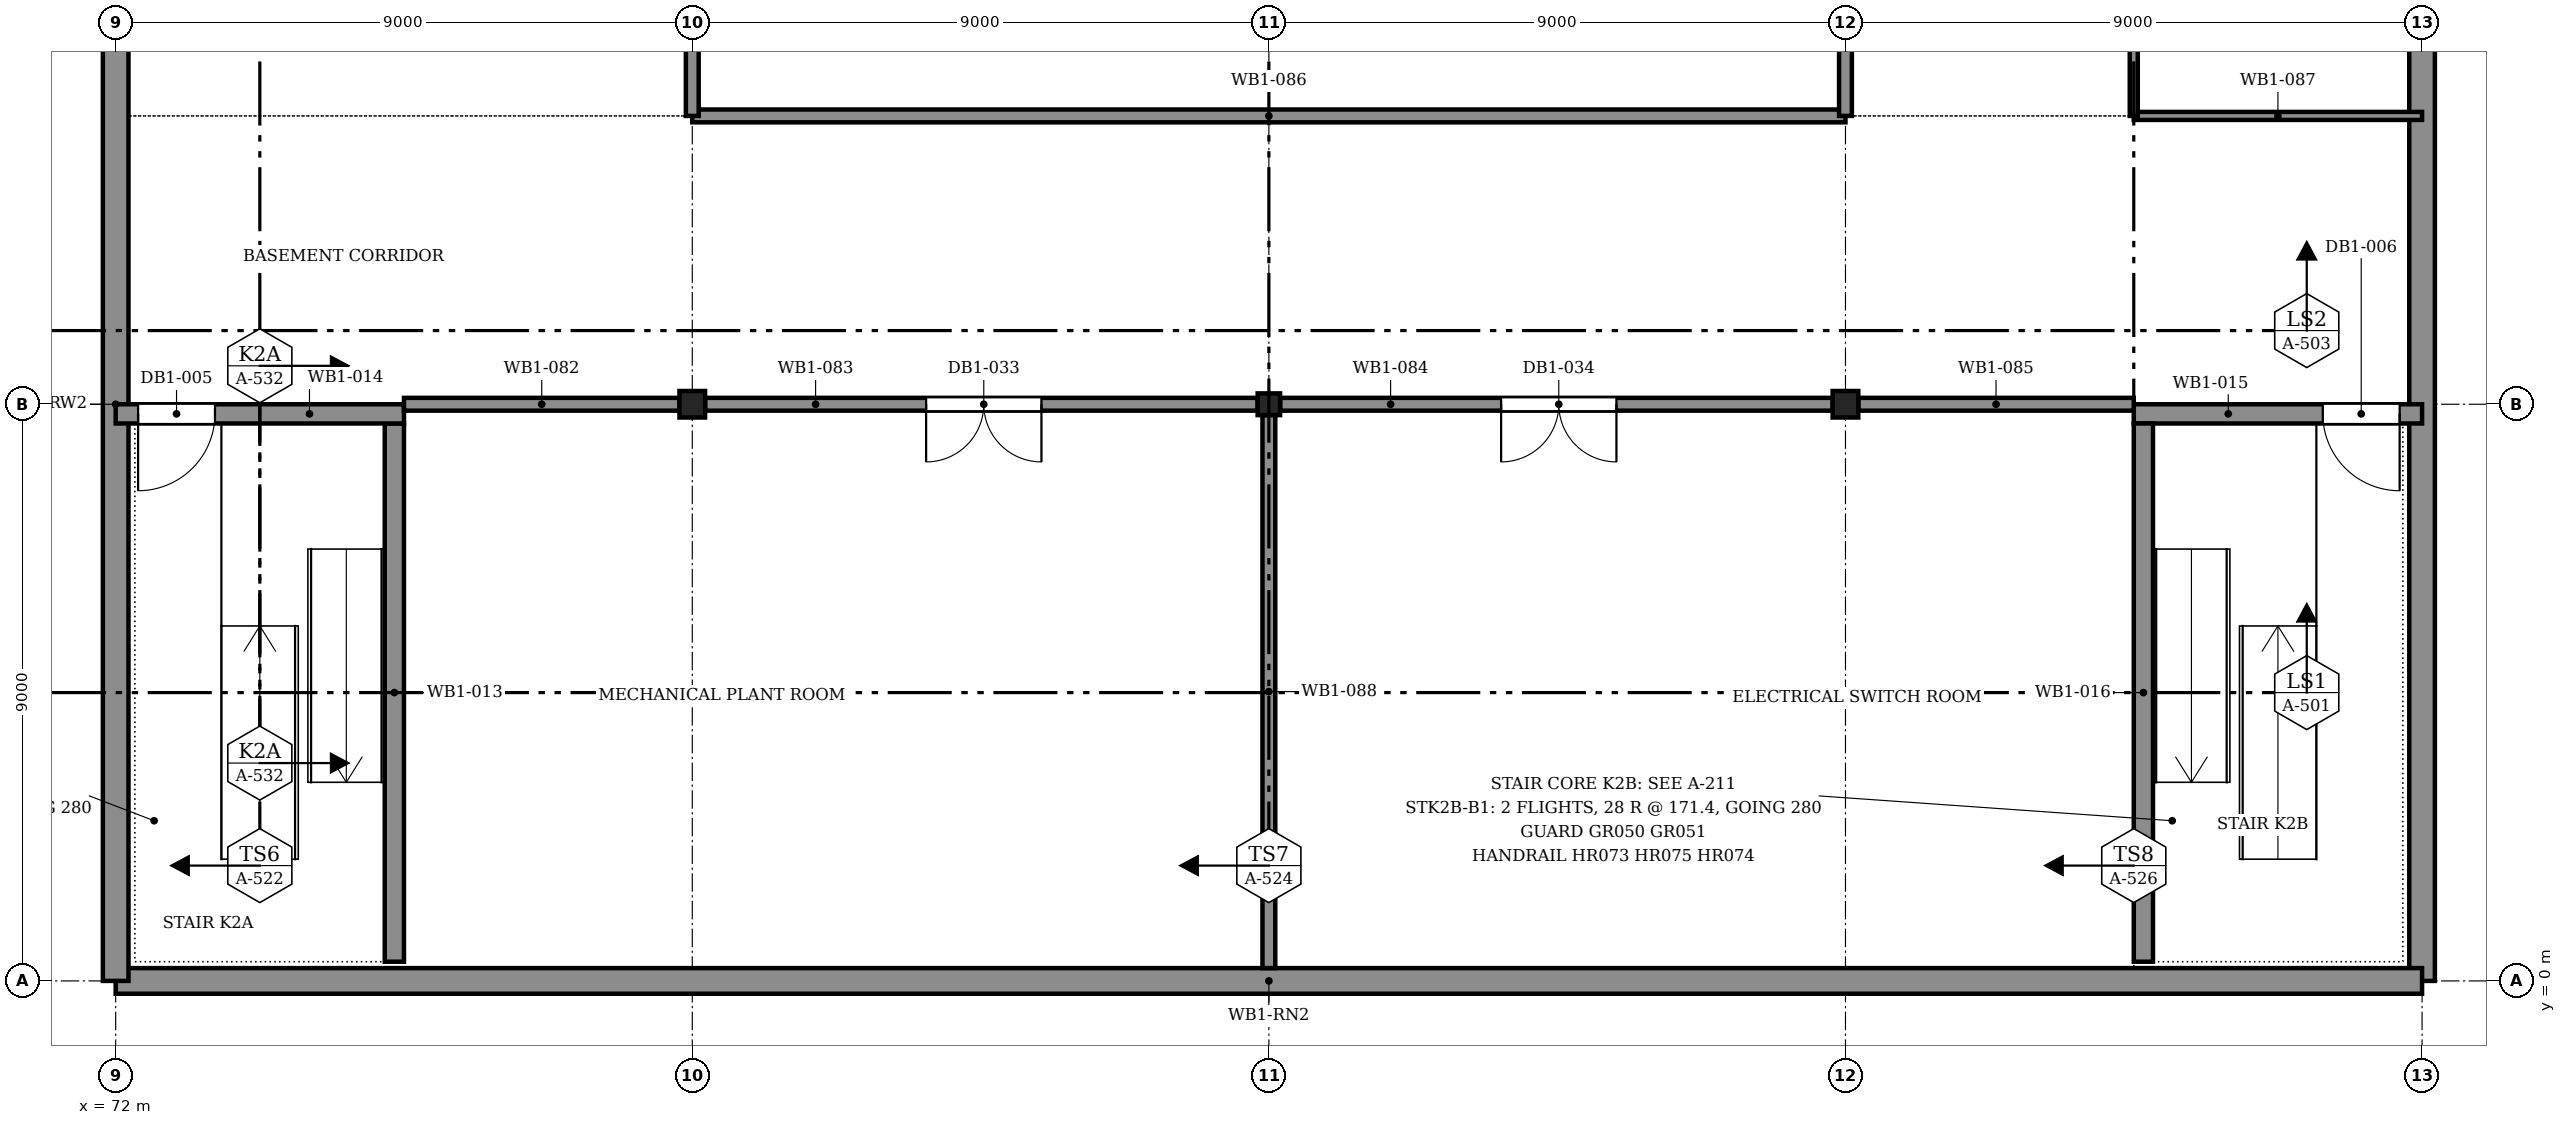
"""IFC4 building model, lengths in metres.
Left out: names, types, materials, properties, quantities, classifications, styles, units other than length and angle.
Written with IfcOpenShell. Run it as: python <this file> out.ifc"""

import sys

from ifc_helpers import new_model, si_unit, direction, frame, frame_2d, origin, origin_2d, place, context, subcontext, project, spatial, rectangle, i_section, extrude, element, fill, save


model = new_model("IFC4")
c1 = context("Model", 3, precision=1e-05, world=origin(), true_north=direction((0.0, 1.0)))
c2 = subcontext(c1, "Body", "Model", "MODEL_VIEW")
j1 = project(units=[si_unit("LENGTHUNIT", "METRE"), si_unit("PLANEANGLEUNIT", "RADIAN")], contexts=[c1])
p1 = place(None, origin())
s1 = spatial("IfcSite", under=j1, at=p1, CompositionType="ELEMENT")
p2 = place(p1, origin())
s2 = spatial("IfcBuilding", under=s1, at=p2, CompositionType="ELEMENT")
p3 = place(p2, frame((0.0, 0.0, -4.8)))
s3 = spatial("IfcBuildingStorey", under=s2, at=p3, CompositionType="ELEMENT", Elevation=-4.8)
p4 = place(p3, frame((108.0, 0.0, 0.0), z_axis=(0.0, 0.0, 1.0), x_axis=(0.0, 1.0, 0.0)))
e1 = element("IfcWall", 1, at=p4, inside=s3, PredefinedType="SOLIDWALL", context=c2, shape_type="SweptSolid", body=[
    extrude(rectangle(XDim=63.0, YDim=0.4, at=frame_2d((31.5, 0.0))), origin(), (0.0, 0.0, 1.0), 4.8),
])
p5 = place(p3, frame((72.0, 0.0, 0.0), z_axis=(0.0, 0.0, 1.0), x_axis=(1.0, 0.0, 0.0)))
e2 = element("IfcWall", 2, at=p5, inside=s3, PredefinedType="SOLIDWALL", context=c2, shape_type="SweptSolid", body=[
    extrude(rectangle(XDim=36.0, YDim=0.4, at=frame_2d((18.0, 0.0))), origin(), (0.0, 0.0, 1.0), 4.8),
])
p6 = place(p3, frame((72.0, 0.0, 0.0), z_axis=(0.0, 0.0, 1.0), x_axis=(0.0, 1.0, 0.0)))
e3 = element("IfcWall", 3, at=p6, inside=s3, PredefinedType="SOLIDWALL", context=c2, shape_type="SweptSolid", body=[
    extrude(rectangle(XDim=18.0, YDim=0.4, at=frame_2d((9.0, 0.0))), origin(), (0.0, 0.0, 1.0), 4.8),
])
p7 = place(p3, frame((81.0, 9.0, -0.6), z_axis=(0.0, 0.0, 1.0), x_axis=(1.0, 0.0, 0.0)))
e4 = element("IfcColumn", 4, at=p7, inside=s3, PredefinedType="COLUMN", context=c2, shape_type="SweptSolid", body=[
    extrude(i_section(OverallWidth=0.4, OverallDepth=0.414, WebThickness=0.025, FlangeThickness=0.032, at=origin_2d()), origin(), (0.0, 0.0, 1.0), 5.4),
])
p8 = place(p3, frame((90.0, 9.0, -0.6), z_axis=(0.0, 0.0, 1.0), x_axis=(1.0, 0.0, 0.0)))
e5 = element("IfcColumn", 5, at=p8, inside=s3, PredefinedType="COLUMN", context=c2, shape_type="SweptSolid", body=[
    extrude(i_section(OverallWidth=0.35, OverallDepth=0.339, WebThickness=0.025, FlangeThickness=0.032, at=origin_2d()), origin(), (0.0, 0.0, 1.0), 5.4),
])
p9 = place(p3, frame((99.0, 9.0, -0.6), z_axis=(0.0, 0.0, 1.0), x_axis=(1.0, 0.0, 0.0)))
e6 = element("IfcColumn", 6, at=p9, inside=s3, PredefinedType="COLUMN", context=c2, shape_type="SweptSolid", body=[
    extrude(i_section(OverallWidth=0.4, OverallDepth=0.414, WebThickness=0.025, FlangeThickness=0.032, at=origin_2d()), origin(), (0.0, 0.0, 1.0), 5.4),
])
p10 = place(p3, frame((76.35, 0.3, 0.0), z_axis=(0.0, 0.0, 1.0), x_axis=(0.0, 1.0, 0.0)))
e7 = element("IfcWall", 7, at=p10, inside=s3, PredefinedType="SOLIDWALL", context=c2, shape_type="SweptSolid", body=[
    extrude(rectangle(XDim=8.4, YDim=0.3, at=frame_2d((4.2, 0.0))), origin(), (0.0, 0.0, 1.0), 4.8),
])
p11 = place(p3, frame((72.0, 8.85, 0.0), z_axis=(0.0, 0.0, 1.0), x_axis=(1.0, 0.0, 0.0)))
e8 = element("IfcWall", 8, at=p11, inside=s3, PredefinedType="SOLIDWALL", context=c2, shape_type="SweptSolid", body=[
    extrude(rectangle(XDim=4.5, YDim=0.3, at=frame_2d((2.25, 0.0))), origin(), (0.0, 0.0, 1.0), 4.8),
])
p12 = place(p11, frame((0.35, 0.0, 0.0)))
e9 = element("IfcOpeningElement", 9, at=p12, cuts=e8, PredefinedType="OPENING", context=c2, shape_type="SweptSolid", body=[
    extrude(rectangle(XDim=1.2, YDim=2.1, at=frame_2d((0.6, 1.05))), frame((0.0, 0.16, 0.0), z_axis=(0.0, -1.0, 0.0), x_axis=(1.0, 0.0, 0.0)), (0.0, 0.0, 1.0), 0.32),
])
p13 = place(p3, frame((103.5, 8.85, 0.0), z_axis=(0.0, 0.0, 1.0), x_axis=(1.0, 0.0, 0.0)))
e10 = element("IfcWall", 10, at=p13, inside=s3, PredefinedType="SOLIDWALL", context=c2, shape_type="SweptSolid", body=[
    extrude(rectangle(XDim=4.5, YDim=0.3, at=frame_2d((2.25, 0.0))), origin(), (0.0, 0.0, 1.0), 4.8),
])
p14 = place(p13, frame((2.95, 0.0, 0.0)))
e11 = element("IfcOpeningElement", 11, at=p14, cuts=e10, PredefinedType="OPENING", context=c2, shape_type="SweptSolid", body=[
    extrude(rectangle(XDim=1.2, YDim=2.1, at=frame_2d((0.6, 1.05))), frame((0.0, 0.16, 0.0), z_axis=(0.0, -1.0, 0.0), x_axis=(1.0, 0.0, 0.0)), (0.0, 0.0, 1.0), 0.32),
])
p15 = place(p3, frame((103.65, 0.3, 0.0), z_axis=(0.0, 0.0, 1.0), x_axis=(0.0, 1.0, 0.0)))
e12 = element("IfcWall", 12, at=p15, inside=s3, PredefinedType="SOLIDWALL", context=c2, shape_type="SweptSolid", body=[
    extrude(rectangle(XDim=8.4, YDim=0.3, at=frame_2d((4.2, 0.0))), origin(), (0.0, 0.0, 1.0), 4.8),
])
p16 = place(p3, frame((76.5, 9.0, 0.0), z_axis=(0.0, 0.0, 1.0), x_axis=(1.0, 0.0, 0.0)))
e13 = element("IfcWall", 13, at=p16, inside=s3, PredefinedType="PARTITIONING", context=c2, shape_type="SweptSolid", body=[
    extrude(rectangle(XDim=4.3, YDim=0.2, at=frame_2d((2.15, 0.0))), origin(), (0.0, 0.0, 1.0), 4.023),
])
p17 = place(p3, frame((81.2, 9.0, 0.0), z_axis=(0.0, 0.0, 1.0), x_axis=(1.0, 0.0, 0.0)))
e14 = element("IfcWall", 14, at=p17, inside=s3, PredefinedType="PARTITIONING", context=c2, shape_type="SweptSolid", body=[
    extrude(rectangle(XDim=8.625, YDim=0.2, at=frame_2d((4.312, 0.0))), origin(), (0.0, 0.0, 1.0), 4.023),
])
p18 = place(p17, frame((3.45, 0.0, 0.0)))
e15 = element("IfcOpeningElement", 15, at=p18, cuts=e14, PredefinedType="OPENING", context=c2, shape_type="SweptSolid", body=[
    extrude(rectangle(XDim=1.8, YDim=2.1, at=frame_2d((0.9, 1.05))), frame((0.0, 0.11, 0.0), z_axis=(0.0, -1.0, 0.0), x_axis=(1.0, 0.0, 0.0)), (0.0, 0.0, 1.0), 0.22),
])
p19 = place(p3, frame((90.175, 9.0, 0.0), z_axis=(0.0, 0.0, 1.0), x_axis=(1.0, 0.0, 0.0)))
e16 = element("IfcWall", 16, at=p19, inside=s3, PredefinedType="PARTITIONING", context=c2, shape_type="SweptSolid", body=[
    extrude(rectangle(XDim=8.625, YDim=0.2, at=frame_2d((4.312, 0.0))), origin(), (0.0, 0.0, 1.0), 4.023),
])
p20 = place(p19, frame((3.45, 0.0, 0.0)))
e17 = element("IfcOpeningElement", 17, at=p20, cuts=e16, PredefinedType="OPENING", context=c2, shape_type="SweptSolid", body=[
    extrude(rectangle(XDim=1.8, YDim=2.1, at=frame_2d((0.9, 1.05))), frame((0.0, 0.11, 0.0), z_axis=(0.0, -1.0, 0.0), x_axis=(1.0, 0.0, 0.0)), (0.0, 0.0, 1.0), 0.22),
])
p21 = place(p3, frame((99.2, 9.0, 0.0), z_axis=(0.0, 0.0, 1.0), x_axis=(1.0, 0.0, 0.0)))
e18 = element("IfcWall", 18, at=p21, inside=s3, PredefinedType="PARTITIONING", context=c2, shape_type="SweptSolid", body=[
    extrude(rectangle(XDim=4.3, YDim=0.2, at=frame_2d((2.15, 0.0))), origin(), (0.0, 0.0, 1.0), 4.023),
])
p22 = place(p3, frame((81.0, 13.5, 0.0), z_axis=(0.0, 0.0, 1.0), x_axis=(1.0, 0.0, 0.0)))
e19 = element("IfcWall", 19, at=p22, inside=s3, PredefinedType="PARTITIONING", context=c2, shape_type="SweptSolid", body=[
    extrude(rectangle(XDim=18.0, YDim=0.2, at=frame_2d((9.0, 0.0))), origin(), (0.0, 0.0, 1.0), 4.023),
])
p23 = place(p3, frame((103.5, 13.5, 0.0), z_axis=(0.0, 0.0, 1.0), x_axis=(1.0, 0.0, 0.0)))
e20 = element("IfcWall", 20, at=p23, inside=s3, PredefinedType="PARTITIONING", context=c2, shape_type="SweptSolid", body=[
    extrude(rectangle(XDim=4.5, YDim=0.125, at=frame_2d((2.25, 0.0))), origin(), (0.0, 0.0, 1.0), 4.181),
])
p24 = place(p3, frame((90.0, 0.2, 0.0), z_axis=(0.0, 0.0, 1.0), x_axis=(0.0, 1.0, 0.0)))
e21 = element("IfcWall", 21, at=p24, inside=s3, PredefinedType="PARTITIONING", context=c2, shape_type="SweptSolid", body=[
    extrude(rectangle(XDim=8.631, YDim=0.2, at=frame_2d((4.315, 0.0))), origin(), (0.0, 0.0, 1.0), 4.023),
])
p25 = place(p3, frame((81.0, 13.5, 0.0), z_axis=(0.0, 0.0, 1.0), x_axis=(0.0, 1.0, 0.0)))
e22 = element("IfcWall", 22, at=p25, inside=s3, PredefinedType="PARTITIONING", context=c2, shape_type="SweptSolid", body=[
    extrude(rectangle(XDim=4.293, YDim=0.2, at=frame_2d((2.146, 0.0))), origin(), (0.0, 0.0, 1.0), 4.023),
])
p26 = place(p25, frame((1.21, 0.0, 0.0)))
e23 = element("IfcOpeningElement", 23, at=p26, cuts=e22, PredefinedType="OPENING", context=c2, shape_type="SweptSolid", body=[
    extrude(rectangle(XDim=1.8, YDim=2.1, at=frame_2d((0.9, 1.05))), frame((0.0, 0.11, 0.0), z_axis=(0.0, -1.0, 0.0), x_axis=(1.0, 0.0, 0.0)), (0.0, 0.0, 1.0), 0.22),
])
p27 = place(p3, frame((99.0, 13.5, 0.0), z_axis=(0.0, 0.0, 1.0), x_axis=(0.0, 1.0, 0.0)))
e24 = element("IfcWall", 24, at=p27, inside=s3, PredefinedType="PARTITIONING", context=c2, shape_type="SweptSolid", body=[
    extrude(rectangle(XDim=4.331, YDim=0.2, at=frame_2d((2.165, 0.0))), origin(), (0.0, 0.0, 1.0), 4.023),
])
p28 = place(p3, frame((103.5, 13.5, 0.0), z_axis=(0.0, 0.0, 1.0), x_axis=(0.0, 1.0, 0.0)))
e25 = element("IfcWall", 25, at=p28, inside=s3, PredefinedType="PARTITIONING", context=c2, shape_type="SweptSolid", body=[
    extrude(rectangle(XDim=13.5, YDim=0.125, at=frame_2d((6.75, 0.0))), origin(), (0.0, 0.0, 1.0), 4.023),
])
p29 = place(p28, frame((6.272, 0.0, 0.0)))
e26 = element("IfcOpeningElement", 26, at=p29, cuts=e25, PredefinedType="OPENING", context=c2, shape_type="SweptSolid", body=[
    extrude(rectangle(XDim=1.0, YDim=2.1, at=frame_2d((0.5, 1.05))), frame((0.0, 0.073, 0.0), z_axis=(0.0, -1.0, 0.0), x_axis=(1.0, 0.0, 0.0)), (0.0, 0.0, 1.0), 0.145),
])
p30 = place(p12, frame((1.2, 0.0, 0.0), z_axis=(0.0, 0.0, 1.0), x_axis=(-1.0, 0.0, 0.0)))
e27 = element("IfcDoor", 27, at=p30, inside=s3, OperationType="SINGLE_SWING_LEFT", PredefinedType="DOOR", context=c2, shape_type="SweptSolid", body=[
    extrude(rectangle(XDim=1.2, YDim=2.1, at=frame_2d((0.6, 1.05))), frame((0.0, 0.025, 0.0), z_axis=(0.0, -1.0, 0.0), x_axis=(1.0, 0.0, 0.0)), (0.0, 0.0, 1.0), 0.05),
])
fill(e9, e27)
p31 = place(p14, frame((1.2, 0.0, 0.0), z_axis=(0.0, 0.0, 1.0), x_axis=(-1.0, 0.0, 0.0)))
e28 = element("IfcDoor", 28, at=p31, inside=s3, OperationType="SINGLE_SWING_RIGHT", PredefinedType="DOOR", context=c2, shape_type="SweptSolid", body=[
    extrude(rectangle(XDim=1.2, YDim=2.1, at=frame_2d((0.6, 1.05))), frame((0.0, 0.025, 0.0), z_axis=(0.0, -1.0, 0.0), x_axis=(1.0, 0.0, 0.0)), (0.0, 0.0, 1.0), 0.05),
])
fill(e11, e28)
p32 = place(p18, frame((1.8, 0.0, 0.0), z_axis=(0.0, 0.0, 1.0), x_axis=(-1.0, 0.0, 0.0)))
e29 = element("IfcDoor", 29, at=p32, inside=s3, OperationType="DOUBLE_DOOR_SINGLE_SWING", PredefinedType="DOOR", context=c2, shape_type="SweptSolid", body=[
    extrude(rectangle(XDim=1.8, YDim=2.1, at=frame_2d((0.9, 1.05))), frame((0.0, 0.025, 0.0), z_axis=(0.0, -1.0, 0.0), x_axis=(1.0, 0.0, 0.0)), (0.0, 0.0, 1.0), 0.05),
])
fill(e15, e29)
p33 = place(p20, frame((1.8, 0.0, 0.0), z_axis=(0.0, 0.0, 1.0), x_axis=(-1.0, 0.0, 0.0)))
e30 = element("IfcDoor", 30, at=p33, inside=s3, OperationType="DOUBLE_DOOR_SINGLE_SWING", PredefinedType="DOOR", context=c2, shape_type="SweptSolid", body=[
    extrude(rectangle(XDim=1.8, YDim=2.1, at=frame_2d((0.9, 1.05))), frame((0.0, 0.025, 0.0), z_axis=(0.0, -1.0, 0.0), x_axis=(1.0, 0.0, 0.0)), (0.0, 0.0, 1.0), 0.05),
])
fill(e17, e30)
save(model, sys.argv[1])
